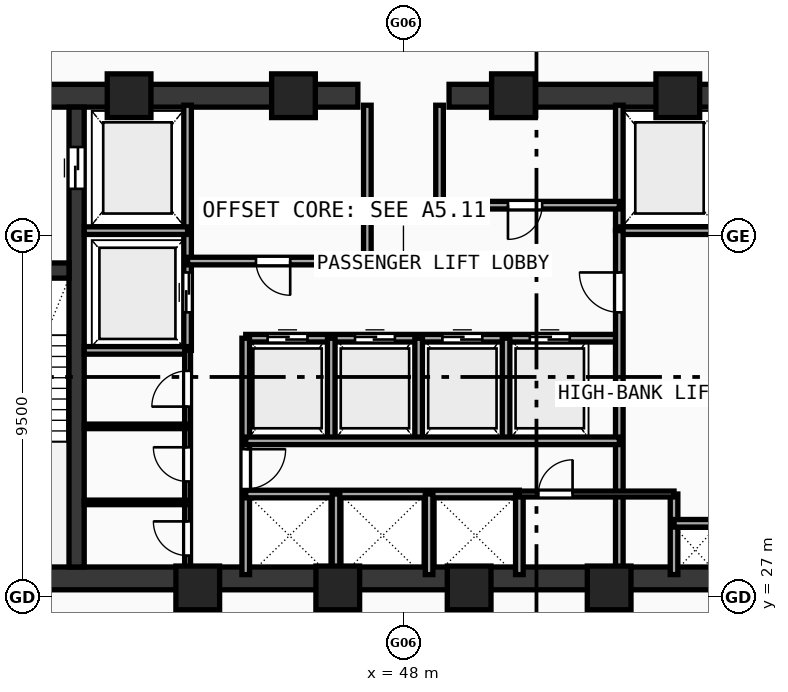
"""IFC4 building model, lengths in metres.
Left out: names, types, materials, properties, quantities, classifications, styles, units other than length and angle.
Written with IfcOpenShell. Run it as: python <this file> out.ifc"""

import sys

from ifc_helpers import new_model, si_unit, direction, frame, frame_2d, origin, origin_with_axes, origin_2d, place, context, subcontext, project, spatial, rectangle, hollow_rectangle, extrude, source, transform, mapped, element, fill, save


model = new_model("IFC4")
c1 = context("Model", 3, precision=1e-05, world=origin(), true_north=direction((0.0, 1.0)))
c2 = subcontext(c1, "Body", "Model", "MODEL_VIEW")
j1 = project(units=[si_unit("LENGTHUNIT", "METRE"), si_unit("PLANEANGLEUNIT", "RADIAN")], contexts=[c1])
p1 = place(None, origin())
s1 = spatial("IfcSite", under=j1, at=p1, CompositionType="ELEMENT")
p2 = place(p1, origin())
s2 = spatial("IfcBuilding", under=s1, at=p2, CompositionType="ELEMENT")
p3 = place(p2, frame((0.0, 0.0, 148.23)))
s3 = spatial("IfcBuildingStorey", under=s2, at=p3, CompositionType="ELEMENT", Elevation=148.23)
p4 = place(p3, frame((35.5, 27.5, 0.0), z_axis=(0.0, 0.0, 1.0), x_axis=(1.0, 0.0, 0.0)))
e1 = element("IfcWall", 1, at=p4, inside=s3, PredefinedType="SHEAR", context=c2, shape_type="SweptSolid", body=[
    extrude(rectangle(XDim=25.0, YDim=0.6, at=frame_2d((12.5, 0.0))), origin(), (0.0, 0.0, 1.0), 3.42),
])
p5 = place(p3, frame((35.5, 40.2, 0.0), z_axis=(0.0, 0.0, 1.0), x_axis=(1.0, 0.0, 0.0)))
e2 = element("IfcWall", 2, at=p5, inside=s3, PredefinedType="SHEAR", context=c2, shape_type="SweptSolid", body=[
    extrude(rectangle(XDim=11.3, YDim=0.6, at=frame_2d((5.65, 0.0))), origin(), (0.0, 0.0, 1.0), 3.42),
])
p6 = place(p5, frame((1.65, 0.0, 0.0)))
e3 = element("IfcOpeningElement", 3, at=p6, cuts=e2, PredefinedType="OPENING", context=c2, shape_type="SweptSolid", body=[
    extrude(rectangle(XDim=1.05, YDim=2.1, at=frame_2d((0.525, 1.05))), frame((0.0, 0.31, 0.0), z_axis=(0.0, -1.0, 0.0), x_axis=(1.0, 0.0, 0.0)), (0.0, 0.0, 1.0), 0.62),
])
p7 = place(p3, frame((49.2, 40.2, 0.0), z_axis=(0.0, 0.0, 1.0), x_axis=(1.0, 0.0, 0.0)))
e4 = element("IfcWall", 4, at=p7, inside=s3, PredefinedType="SHEAR", context=c2, shape_type="SweptSolid", body=[
    extrude(rectangle(XDim=11.3, YDim=0.6, at=frame_2d((5.65, 0.0))), origin(), (0.0, 0.0, 1.0), 3.42),
])
p8 = place(p7, frame((8.6, 0.0, 0.0)))
e5 = element("IfcOpeningElement", 5, at=p8, cuts=e4, PredefinedType="OPENING", context=c2, shape_type="SweptSolid", body=[
    extrude(rectangle(XDim=1.05, YDim=2.1, at=frame_2d((0.525, 1.05))), frame((0.0, 0.31, 0.0), z_axis=(0.0, -1.0, 0.0), x_axis=(1.0, 0.0, 0.0)), (0.0, 0.0, 1.0), 0.62),
])
p9 = place(p3, frame((39.4, 27.8, 0.0), z_axis=(0.0, 0.0, 1.0), x_axis=(0.0, 1.0, 0.0)))
e6 = element("IfcWall", 6, at=p9, inside=s3, PredefinedType="SHEAR", context=c2, shape_type="SweptSolid", body=[
    extrude(rectangle(XDim=12.1, YDim=0.4, at=frame_2d((6.05, 0.0))), origin(), (0.0, 0.0, 1.0), 3.42),
])
p10 = place(p9, frame((9.95, 0.0, 0.0)))
e7 = element("IfcOpeningElement", 7, at=p10, cuts=e6, PredefinedType="OPENING", context=c2, shape_type="SweptSolid", body=[
    extrude(rectangle(XDim=1.1, YDim=2.1, at=frame_2d((0.55, 1.05))), frame((0.0, 0.21, 0.0), z_axis=(0.0, -1.0, 0.0), x_axis=(1.0, 0.0, 0.0)), (0.0, 0.0, 1.0), 0.42),
])
p11 = place(p3, frame((36.1, 35.6, 0.0), z_axis=(0.0, 0.0, 1.0), x_axis=(1.0, 0.0, 0.0)))
e8 = element("IfcWall", 8, at=p11, inside=s3, PredefinedType="SHEAR", context=c2, shape_type="SweptSolid", body=[
    extrude(rectangle(XDim=3.1, YDim=0.4, at=frame_2d((1.55, 0.0))), origin(), (0.0, 0.0, 1.0), 3.42),
])
p12 = place(p11, frame((1.02, 0.0, 0.0)))
e9 = element("IfcOpeningElement", 9, at=p12, cuts=e8, PredefinedType="OPENING", context=c2, shape_type="SweptSolid", body=[
    extrude(rectangle(XDim=1.05, YDim=2.1, at=frame_2d((0.525, 1.05))), frame((0.0, 0.21, 0.0), z_axis=(0.0, -1.0, 0.0), x_axis=(1.0, 0.0, 0.0)), (0.0, 0.0, 1.0), 0.42),
])
m1 = source(origin(), c2, "Body", "SweptSolid", [
    extrude(hollow_rectangle(XDim=1.15, YDim=1.15, WallThickness=0.048, at=origin_2d()), origin(), (0.0, 0.0, 1.0), 3.68),
])
for number, where, z_axis, x_axis in (
    (10, (42.588, 27.25, -0.26), (0.0, 0.0, 1.0), (1.0, 0.0, 0.0)),
    (11, (46.272, 27.25, -0.26), (0.0, 0.0, 1.0), (1.0, 0.0, 0.0)),
    (12, (49.729, 27.25, -0.26), (0.0, 0.0, 1.0), (1.0, 0.0, 0.0)),
    (13, (53.412, 27.25, -0.26), (0.0, 0.0, 1.0), (1.0, 0.0, 0.0)),
    (14, (55.219, 40.2, -0.26), (0.0, 0.0, 1.0), (1.0, 0.0, 0.0)),
    (15, (50.894, 40.2, -0.26), (0.0, 0.0, 1.0), (1.0, 0.0, 0.0)),
    (16, (45.106, 40.2, -0.26), (0.0, 0.0, 1.0), (1.0, 0.0, 0.0)),
    (17, (40.781, 40.2, -0.26), (0.0, 0.0, 1.0), (1.0, 0.0, 0.0)),
):
    element("IfcColumn", number, at=place(p3, frame(where, z_axis=z_axis, x_axis=x_axis)), inside=s3, PredefinedType="COLUMN", context=c2, shape_type="MappedRepresentation", body=[
        mapped(m1, transform((0.0, 0.0, 0.0), scale=1.0)),
    ])
p13 = place(p3, frame((42.32, 33.5, 0.0), z_axis=(0.0, 0.0, 1.0), x_axis=(0.0, 1.0, 0.0)))
e18 = element("IfcWall", 18, at=p13, inside=s3, PredefinedType="SOLIDWALL", context=c2, shape_type="SweptSolid", body=[
    extrude(rectangle(XDim=6.45, YDim=0.2, at=frame_2d((3.225, 0.0))), origin(), (0.0, 0.0, 1.0), 3.42),
])
p14 = place(p13, frame((1.0, 0.0, 0.0)))
e19 = element("IfcOpeningElement", 19, at=p14, cuts=e18, PredefinedType="OPENING", context=c2, shape_type="SweptSolid", body=[
    extrude(rectangle(XDim=1.05, YDim=2.1, at=frame_2d((0.525, 1.05))), frame((0.0, 0.11, 0.0), z_axis=(0.0, -1.0, 0.0), x_axis=(1.0, 0.0, 0.0)), (0.0, 0.0, 1.0), 0.22),
])
for number, where, z_axis, x_axis in (
    (20, (39.6, 36.65, 0.0), (0.0, 0.0, 1.0), (1.0, 0.0, 0.0)),
    (21, (39.6, 33.5, 0.0), (0.0, 0.0, 1.0), (1.0, 0.0, 0.0)),
):
    element("IfcWall", number, at=place(p3, frame(where, z_axis=z_axis, x_axis=x_axis)), inside=s3, PredefinedType="SOLIDWALL", context=c2, shape_type="SweptSolid", body=[
        extrude(rectangle(XDim=2.72, YDim=0.2, at=frame_2d((1.36, 0.0))), origin(), (0.0, 0.0, 1.0), 3.42),
    ])
p15 = place(p3, frame((53.68, 36.65, 0.0), z_axis=(0.0, 0.0, 1.0), x_axis=(0.0, 1.0, 0.0)))
e22 = element("IfcWall", 22, at=p15, inside=s3, PredefinedType="SOLIDWALL", context=c2, shape_type="SweptSolid", body=[
    extrude(rectangle(XDim=3.3, YDim=0.2, at=frame_2d((1.65, 0.0))), origin(), (0.0, 0.0, 1.0), 3.42),
])
p16 = place(p3, frame((53.68, 36.65, 0.0), z_axis=(0.0, 0.0, 1.0), x_axis=(1.0, 0.0, 0.0)))
e23 = element("IfcWall", 23, at=p16, inside=s3, PredefinedType="SOLIDWALL", context=c2, shape_type="SweptSolid", body=[
    extrude(rectangle(XDim=2.72, YDim=0.2, at=frame_2d((1.36, 0.0))), origin(), (0.0, 0.0, 1.0), 3.42),
])
p17 = place(p3, frame((42.32, 35.85, 0.0), z_axis=(0.0, 0.0, 1.0), x_axis=(1.0, 0.0, 0.0)))
e24 = element("IfcWall", 24, at=p17, inside=s3, PredefinedType="SOLIDWALL", context=c2, shape_type="SweptSolid", body=[
    extrude(rectangle(XDim=4.73, YDim=0.2, at=frame_2d((2.365, 0.0))), origin(), (0.0, 0.0, 1.0), 3.42),
])
p18 = place(p17, frame((1.8, 0.0, 0.0)))
e25 = element("IfcOpeningElement", 25, at=p18, cuts=e24, PredefinedType="OPENING", context=c2, shape_type="SweptSolid", body=[
    extrude(rectangle(XDim=0.9, YDim=2.1, at=frame_2d((0.45, 1.05))), frame((0.0, 0.11, 0.0), z_axis=(0.0, -1.0, 0.0), x_axis=(1.0, 0.0, 0.0)), (0.0, 0.0, 1.0), 0.22),
])
p19 = place(p3, frame((48.95, 37.32, 0.0), z_axis=(0.0, 0.0, 1.0), x_axis=(1.0, 0.0, 0.0)))
e26 = element("IfcWall", 26, at=p19, inside=s3, PredefinedType="SOLIDWALL", context=c2, shape_type="SweptSolid", body=[
    extrude(rectangle(XDim=4.73, YDim=0.2, at=frame_2d((2.365, 0.0))), origin(), (0.0, 0.0, 1.0), 3.42),
])
p20 = place(p19, frame((1.8, 0.0, 0.0)))
e27 = element("IfcOpeningElement", 27, at=p20, cuts=e26, PredefinedType="OPENING", context=c2, shape_type="SweptSolid", body=[
    extrude(rectangle(XDim=0.9, YDim=2.1, at=frame_2d((0.45, 1.05))), frame((0.0, 0.11, 0.0), z_axis=(0.0, -1.0, 0.0), x_axis=(1.0, 0.0, 0.0)), (0.0, 0.0, 1.0), 0.22),
])
p21 = place(p3, frame((47.05, 35.85, 0.0), z_axis=(0.0, 0.0, 1.0), x_axis=(0.0, 1.0, 0.0)))
e28 = element("IfcWall", 28, at=p21, inside=s3, PredefinedType="SOLIDWALL", context=c2, shape_type="SweptSolid", body=[
    extrude(rectangle(XDim=4.1, YDim=0.2, at=frame_2d((2.05, 0.0))), origin(), (0.0, 0.0, 1.0), 3.42),
])
p22 = place(p3, frame((48.95, 37.32, 0.0), z_axis=(0.0, 0.0, 1.0), x_axis=(0.0, 1.0, 0.0)))
e29 = element("IfcWall", 29, at=p22, inside=s3, PredefinedType="SOLIDWALL", context=c2, shape_type="SweptSolid", body=[
    extrude(rectangle(XDim=2.63, YDim=0.2, at=frame_2d((1.315, 0.0))), origin(), (0.0, 0.0, 1.0), 3.42),
])
p23 = place(p3, frame((43.85, 33.82, 0.0), z_axis=(0.0, 0.0, 1.0), x_axis=(1.0, 0.0, 0.0)))
e30 = element("IfcWall", 30, at=p23, inside=s3, PredefinedType="SOLIDWALL", context=c2, shape_type="SweptSolid", body=[
    extrude(rectangle(XDim=9.83, YDim=0.2, at=frame_2d((4.915, 0.0))), origin(), (0.0, 0.0, 1.0), 3.42),
])
p24 = place(p23, frame((0.575, 0.0, 0.0)))
e31 = element("IfcOpeningElement", 31, at=p24, cuts=e30, PredefinedType="OPENING", context=c2, shape_type="SweptSolid", body=[
    extrude(rectangle(XDim=1.05, YDim=2.1, at=frame_2d((0.525, 1.05))), frame((0.0, 0.11, 0.0), z_axis=(0.0, -1.0, 0.0), x_axis=(1.0, 0.0, 0.0)), (0.0, 0.0, 1.0), 0.22),
])
p25 = place(p23, frame((2.875, 0.0, 0.0)))
e32 = element("IfcOpeningElement", 32, at=p25, cuts=e30, PredefinedType="OPENING", context=c2, shape_type="SweptSolid", body=[
    extrude(rectangle(XDim=1.05, YDim=2.1, at=frame_2d((0.525, 1.05))), frame((0.0, 0.11, 0.0), z_axis=(0.0, -1.0, 0.0), x_axis=(1.0, 0.0, 0.0)), (0.0, 0.0, 1.0), 0.22),
])
p26 = place(p23, frame((5.175, 0.0, 0.0)))
e33 = element("IfcOpeningElement", 33, at=p26, cuts=e30, PredefinedType="OPENING", context=c2, shape_type="SweptSolid", body=[
    extrude(rectangle(XDim=1.05, YDim=2.1, at=frame_2d((0.525, 1.05))), frame((0.0, 0.11, 0.0), z_axis=(0.0, -1.0, 0.0), x_axis=(1.0, 0.0, 0.0)), (0.0, 0.0, 1.0), 0.22),
])
p27 = place(p23, frame((7.475, 0.0, 0.0)))
e34 = element("IfcOpeningElement", 34, at=p27, cuts=e30, PredefinedType="OPENING", context=c2, shape_type="SweptSolid", body=[
    extrude(rectangle(XDim=1.05, YDim=2.1, at=frame_2d((0.525, 1.05))), frame((0.0, 0.11, 0.0), z_axis=(0.0, -1.0, 0.0), x_axis=(1.0, 0.0, 0.0)), (0.0, 0.0, 1.0), 0.22),
])
p28 = place(p3, frame((43.85, 27.6, 0.0), z_axis=(0.0, 0.0, 1.0), x_axis=(0.0, 1.0, 0.0)))
e35 = element("IfcWall", 35, at=p28, inside=s3, PredefinedType="SOLIDWALL", context=c2, shape_type="SweptSolid", body=[
    extrude(rectangle(XDim=6.22, YDim=0.2, at=frame_2d((3.11, 0.0))), origin(), (0.0, 0.0, 1.0), 3.42),
])
p29 = place(p28, frame((2.25, 0.0, 0.0)))
e36 = element("IfcOpeningElement", 36, at=p29, cuts=e35, PredefinedType="OPENING", context=c2, shape_type="SweptSolid", body=[
    extrude(rectangle(XDim=1.05, YDim=2.1, at=frame_2d((0.525, 1.05))), frame((0.0, 0.11, 0.0), z_axis=(0.0, -1.0, 0.0), x_axis=(1.0, 0.0, 0.0)), (0.0, 0.0, 1.0), 0.22),
])
p30 = place(p3, frame((53.68, 27.6, 0.0), z_axis=(0.0, 0.0, 1.0), x_axis=(0.0, 1.0, 0.0)))
e37 = element("IfcWall", 37, at=p30, inside=s3, PredefinedType="SOLIDWALL", context=c2, shape_type="SweptSolid", body=[
    extrude(rectangle(XDim=9.05, YDim=0.2, at=frame_2d((4.525, 0.0))), origin(), (0.0, 0.0, 1.0), 3.42),
])
p31 = place(p30, frame((6.9, 0.0, 0.0)))
e38 = element("IfcOpeningElement", 38, at=p31, cuts=e37, PredefinedType="OPENING", context=c2, shape_type="SweptSolid", body=[
    extrude(rectangle(XDim=1.05, YDim=2.1, at=frame_2d((0.525, 1.05))), frame((0.0, 0.11, 0.0), z_axis=(0.0, -1.0, 0.0), x_axis=(1.0, 0.0, 0.0)), (0.0, 0.0, 1.0), 0.22),
])
for number, where, z_axis, x_axis in (
    (39, (46.1, 31.12, 0.0), (0.0, 0.0, 1.0), (0.0, 1.0, 0.0)),
    (40, (48.4, 31.12, 0.0), (0.0, 0.0, 1.0), (0.0, 1.0, 0.0)),
    (41, (50.7, 31.12, 0.0), (0.0, 0.0, 1.0), (0.0, 1.0, 0.0)),
):
    element("IfcWall", number, at=place(p3, frame(where, z_axis=z_axis, x_axis=x_axis)), inside=s3, PredefinedType="SOLIDWALL", context=c2, shape_type="SweptSolid", body=[
        extrude(rectangle(XDim=2.7, YDim=0.2, at=frame_2d((1.35, 0.0))), origin(), (0.0, 0.0, 1.0), 3.42),
    ])
p32 = place(p3, frame((43.85, 29.72, 0.0), z_axis=(0.0, 0.0, 1.0), x_axis=(1.0, 0.0, 0.0)))
e42 = element("IfcWall", 42, at=p32, inside=s3, PredefinedType="SOLIDWALL", context=c2, shape_type="SweptSolid", body=[
    extrude(rectangle(XDim=7.2, YDim=0.2, at=frame_2d((3.6, 0.0))), origin(), (0.0, 0.0, 1.0), 3.42),
])
p33 = place(p3, frame((51.05, 27.6, 0.0), z_axis=(0.0, 0.0, 1.0), x_axis=(0.0, 1.0, 0.0)))
e43 = element("IfcWall", 43, at=p33, inside=s3, PredefinedType="SOLIDWALL", context=c2, shape_type="SweptSolid", body=[
    extrude(rectangle(XDim=2.12, YDim=0.2, at=frame_2d((1.06, 0.0))), origin(), (0.0, 0.0, 1.0), 3.42),
])
p34 = place(p3, frame((43.85, 31.12, 0.0), z_axis=(0.0, 0.0, 1.0), x_axis=(1.0, 0.0, 0.0)))
e44 = element("IfcWall", 44, at=p34, inside=s3, PredefinedType="SOLIDWALL", context=c2, shape_type="SweptSolid", body=[
    extrude(rectangle(XDim=9.83, YDim=0.2, at=frame_2d((4.915, 0.0))), origin(), (0.0, 0.0, 1.0), 3.42),
])
for number, where, z_axis, x_axis in (
    (45, (46.225, 27.6, 0.0), (0.0, 0.0, 1.0), (0.0, 1.0, 0.0)),
    (46, (48.675, 27.6, 0.0), (0.0, 0.0, 1.0), (0.0, 1.0, 0.0)),
    (47, (55.12, 27.6, 0.0), (0.0, 0.0, 1.0), (0.0, 1.0, 0.0)),
):
    element("IfcWall", number, at=place(p3, frame(where, z_axis=z_axis, x_axis=x_axis)), inside=s3, PredefinedType="SOLIDWALL", context=c2, shape_type="SweptSolid", body=[
        extrude(rectangle(XDim=2.12, YDim=0.2, at=frame_2d((1.06, 0.0))), origin(), (0.0, 0.0, 1.0), 3.42),
    ])
p35 = place(p3, frame((55.12, 28.95, 0.0), z_axis=(0.0, 0.0, 1.0), x_axis=(1.0, 0.0, 0.0)))
e48 = element("IfcWall", 48, at=p35, inside=s3, PredefinedType="SOLIDWALL", context=c2, shape_type="SweptSolid", body=[
    extrude(rectangle(XDim=1.28, YDim=0.2, at=frame_2d((0.64, 0.0))), origin(), (0.0, 0.0, 1.0), 3.42),
])
p36 = place(p3, frame((42.32, 27.6, 0.0), z_axis=(0.0, 0.0, 1.0), x_axis=(0.0, 1.0, 0.0)))
e49 = element("IfcWall", 49, at=p36, inside=s3, PredefinedType="PARTITIONING", context=c2, shape_type="SweptSolid", body=[
    extrude(rectangle(XDim=5.9, YDim=0.155, at=frame_2d((2.95, 0.0))), origin(), (0.0, 0.0, 1.0), 3.42),
])
p37 = place(p36, frame((0.5, 0.0, 0.0)))
e50 = element("IfcOpeningElement", 50, at=p37, cuts=e49, PredefinedType="OPENING", context=c2, shape_type="SweptSolid", body=[
    extrude(rectangle(XDim=0.9, YDim=2.1, at=frame_2d((0.45, 1.05))), frame((0.0, 0.087, 0.0), z_axis=(0.0, -1.0, 0.0), x_axis=(1.0, 0.0, 0.0)), (0.0, 0.0, 1.0), 0.175),
])
p38 = place(p36, frame((2.45, 0.0, 0.0)))
e51 = element("IfcOpeningElement", 51, at=p38, cuts=e49, PredefinedType="OPENING", context=c2, shape_type="SweptSolid", body=[
    extrude(rectangle(XDim=0.9, YDim=2.1, at=frame_2d((0.45, 1.05))), frame((0.0, 0.087, 0.0), z_axis=(0.0, -1.0, 0.0), x_axis=(1.0, 0.0, 0.0)), (0.0, 0.0, 1.0), 0.175),
])
p39 = place(p36, frame((4.42, 0.0, 0.0)))
e52 = element("IfcOpeningElement", 52, at=p39, cuts=e49, PredefinedType="OPENING", context=c2, shape_type="SweptSolid", body=[
    extrude(rectangle(XDim=0.94, YDim=2.1, at=frame_2d((0.47, 1.05))), frame((0.0, 0.087, 0.0), z_axis=(0.0, -1.0, 0.0), x_axis=(1.0, 0.0, 0.0)), (0.0, 0.0, 1.0), 0.175),
])
p40 = place(p3, frame((51.05, 29.72, 0.0), z_axis=(0.0, 0.0, 1.0), x_axis=(1.0, 0.0, 0.0)))
e53 = element("IfcWall", 53, at=p40, inside=s3, PredefinedType="PARTITIONING", context=c2, shape_type="SweptSolid", body=[
    extrude(rectangle(XDim=4.07, YDim=0.155, at=frame_2d((2.035, 0.0))), origin(), (0.0, 0.0, 1.0), 3.42),
])
p41 = place(p40, frame((0.5, 0.0, 0.0)))
e54 = element("IfcOpeningElement", 54, at=p41, cuts=e53, PredefinedType="OPENING", context=c2, shape_type="SweptSolid", body=[
    extrude(rectangle(XDim=0.9, YDim=2.1, at=frame_2d((0.45, 1.05))), frame((0.0, 0.087, 0.0), z_axis=(0.0, -1.0, 0.0), x_axis=(1.0, 0.0, 0.0)), (0.0, 0.0, 1.0), 0.175),
])
for number, where, z_axis, x_axis in (
    (55, (39.6, 29.5, 0.0), (0.0, 0.0, 1.0), (1.0, 0.0, 0.0)),
    (56, (39.6, 31.5, 0.0), (0.0, 0.0, 1.0), (1.0, 0.0, 0.0)),
):
    element("IfcWall", number, at=place(p3, frame(where, z_axis=z_axis, x_axis=x_axis)), inside=s3, PredefinedType="PARTITIONING", context=c2, shape_type="SweptSolid", body=[
        extrude(rectangle(XDim=2.72, YDim=0.12, at=frame_2d((1.36, 0.0))), origin(), (0.0, 0.0, 1.0), 3.42),
    ])
m2 = source(origin(), c2, "Body", "SweptSolid", [
    extrude(rectangle(XDim=1.1, YDim=2.1, at=frame_2d((0.55, 1.05))), frame((0.0, 0.025, 0.0), z_axis=(0.0, -1.0, 0.0), x_axis=(1.0, 0.0, 0.0)), (0.0, 0.0, 1.0), 0.05),
])
p42 = place(p10, frame((1.1, 0.0, 0.0), z_axis=(0.0, 0.0, 1.0), x_axis=(-1.0, 0.0, 0.0)))
e57 = element("IfcDoor", 57, at=p42, inside=s3, OperationType="DOUBLE_DOOR_SLIDING", PredefinedType="DOOR", context=c2, shape_type="MappedRepresentation", body=[
    mapped(m2, transform((0.0, 0.0, 0.0), scale=1.0)),
])
fill(e7, e57)
m3 = source(origin(), c2, "Body", "SweptSolid", [
    extrude(rectangle(XDim=1.05, YDim=2.1, at=frame_2d((0.525, 1.05))), frame((0.0, 0.025, 0.0), z_axis=(0.0, -1.0, 0.0), x_axis=(1.0, 0.0, 0.0)), (0.0, 0.0, 1.0), 0.05),
])
p43 = place(p14, origin_with_axes())
e58 = element("IfcDoor", 58, at=p43, inside=s3, OperationType="DOUBLE_DOOR_SLIDING", PredefinedType="DOOR", context=c2, shape_type="MappedRepresentation", body=[
    mapped(m3, transform((0.0, 0.0, 0.0), scale=1.0)),
])
fill(e19, e58)
m4 = source(origin(), c2, "Body", "SweptSolid", [
    extrude(rectangle(XDim=0.9, YDim=2.1, at=frame_2d((0.45, 1.05))), frame((0.0, 0.025, 0.0), z_axis=(0.0, -1.0, 0.0), x_axis=(1.0, 0.0, 0.0)), (0.0, 0.0, 1.0), 0.05),
])
p44 = place(p18, frame((0.9, 0.0, 0.0), z_axis=(0.0, 0.0, 1.0), x_axis=(-1.0, 0.0, 0.0)))
e59 = element("IfcDoor", 59, at=p44, inside=s3, OperationType="SINGLE_SWING_LEFT", PredefinedType="DOOR", context=c2, shape_type="MappedRepresentation", body=[
    mapped(m4, transform((0.0, 0.0, 0.0), scale=1.0)),
])
fill(e25, e59)
p45 = place(p20, frame((0.9, 0.0, 0.0), z_axis=(0.0, 0.0, 1.0), x_axis=(-1.0, 0.0, 0.0)))
e60 = element("IfcDoor", 60, at=p45, inside=s3, OperationType="SINGLE_SWING_RIGHT", PredefinedType="DOOR", context=c2, shape_type="MappedRepresentation", body=[
    mapped(m4, transform((0.0, 0.0, 0.0), scale=1.0)),
])
fill(e27, e60)
p46 = place(p24, origin_with_axes())
e61 = element("IfcDoor", 61, at=p46, inside=s3, OperationType="DOUBLE_DOOR_SLIDING", PredefinedType="DOOR", context=c2, shape_type="MappedRepresentation", body=[
    mapped(m3, transform((0.0, 0.0, 0.0), scale=1.0)),
])
fill(e31, e61)
p47 = place(p25, origin_with_axes())
e62 = element("IfcDoor", 62, at=p47, inside=s3, OperationType="DOUBLE_DOOR_SLIDING", PredefinedType="DOOR", context=c2, shape_type="MappedRepresentation", body=[
    mapped(m3, transform((0.0, 0.0, 0.0), scale=1.0)),
])
fill(e32, e62)
p48 = place(p26, origin_with_axes())
e63 = element("IfcDoor", 63, at=p48, inside=s3, OperationType="DOUBLE_DOOR_SLIDING", PredefinedType="DOOR", context=c2, shape_type="MappedRepresentation", body=[
    mapped(m3, transform((0.0, 0.0, 0.0), scale=1.0)),
])
fill(e33, e63)
p49 = place(p27, origin_with_axes())
e64 = element("IfcDoor", 64, at=p49, inside=s3, OperationType="DOUBLE_DOOR_SLIDING", PredefinedType="DOOR", context=c2, shape_type="MappedRepresentation", body=[
    mapped(m3, transform((0.0, 0.0, 0.0), scale=1.0)),
])
fill(e34, e64)
p50 = place(p29, frame((1.05, 0.0, 0.0), z_axis=(0.0, 0.0, 1.0), x_axis=(-1.0, 0.0, 0.0)))
e65 = element("IfcDoor", 65, at=p50, inside=s3, OperationType="SINGLE_SWING_LEFT", PredefinedType="DOOR", context=c2, shape_type="MappedRepresentation", body=[
    mapped(m3, transform((0.0, 0.0, 0.0), scale=1.0)),
])
fill(e36, e65)
p51 = place(p31, origin_with_axes())
e66 = element("IfcDoor", 66, at=p51, inside=s3, OperationType="SINGLE_SWING_RIGHT", PredefinedType="DOOR", context=c2, shape_type="MappedRepresentation", body=[
    mapped(m3, transform((0.0, 0.0, 0.0), scale=1.0)),
])
fill(e38, e66)
p52 = place(p37, origin_with_axes())
e67 = element("IfcDoor", 67, at=p52, inside=s3, OperationType="SINGLE_SWING_RIGHT", PredefinedType="DOOR", context=c2, shape_type="MappedRepresentation", body=[
    mapped(m4, transform((0.0, 0.0, 0.0), scale=1.0)),
])
fill(e50, e67)
p53 = place(p38, origin_with_axes())
e68 = element("IfcDoor", 68, at=p53, inside=s3, OperationType="SINGLE_SWING_RIGHT", PredefinedType="DOOR", context=c2, shape_type="MappedRepresentation", body=[
    mapped(m4, transform((0.0, 0.0, 0.0), scale=1.0)),
])
fill(e51, e68)
m5 = source(origin(), c2, "Body", "SweptSolid", [
    extrude(rectangle(XDim=0.94, YDim=2.1, at=frame_2d((0.47, 1.05))), frame((0.0, 0.025, 0.0), z_axis=(0.0, -1.0, 0.0), x_axis=(1.0, 0.0, 0.0)), (0.0, 0.0, 1.0), 0.05),
])
p54 = place(p39, origin_with_axes())
e69 = element("IfcDoor", 69, at=p54, inside=s3, OperationType="SINGLE_SWING_LEFT", PredefinedType="DOOR", context=c2, shape_type="MappedRepresentation", body=[
    mapped(m5, transform((0.0, 0.0, 0.0), scale=1.0)),
])
fill(e52, e69)
p55 = place(p41, origin_with_axes())
e70 = element("IfcDoor", 70, at=p55, inside=s3, OperationType="SINGLE_SWING_RIGHT", PredefinedType="DOOR", context=c2, shape_type="MappedRepresentation", body=[
    mapped(m4, transform((0.0, 0.0, 0.0), scale=1.0)),
])
fill(e54, e70)
save(model, sys.argv[1])
